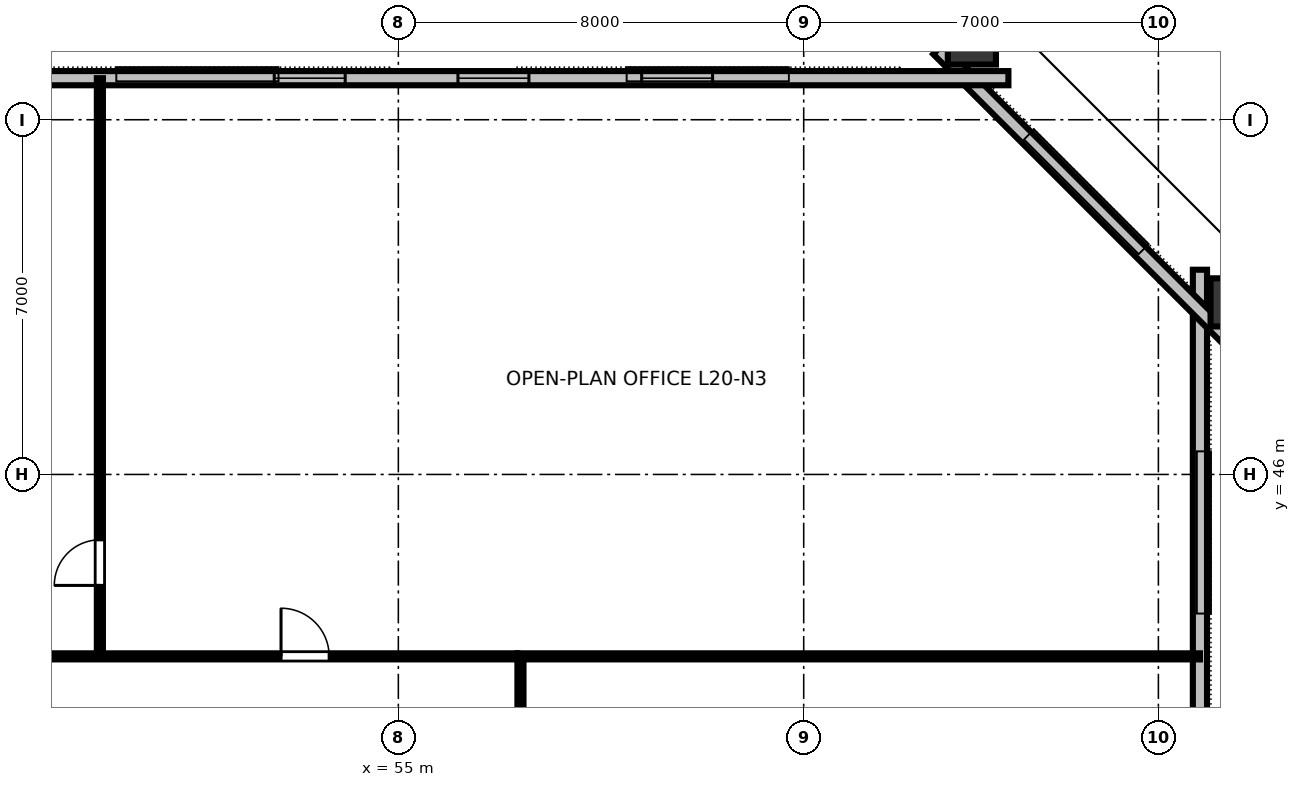
"""IFC4 building model, lengths in metres.
Left out: names, types, materials, properties, quantities, classifications, styles, units other than length and angle.
Written with IfcOpenShell. Run it as: python <this file> out.ifc"""

import sys

from ifc_helpers import new_model, si_unit, direction, frame, frame_2d, origin, origin_2d, place, context, subcontext, project, spatial, rectangle, hollow_rectangle, extrude, element, fill, save


model = new_model("IFC4")
c1 = context("Model", 3, precision=1e-05, world=origin(), true_north=direction((0.0, 1.0)))
c2 = subcontext(c1, "Body", "Model", "MODEL_VIEW")
j1 = project(units=[si_unit("LENGTHUNIT", "METRE"), si_unit("PLANEANGLEUNIT", "RADIAN")], contexts=[c1])
p1 = place(None, origin())
s1 = spatial("IfcSite", under=j1, at=p1, CompositionType="ELEMENT")
p2 = place(p1, origin())
s2 = spatial("IfcBuilding", under=s1, at=p2, CompositionType="ELEMENT")
p3 = place(p2, frame((0.0, 0.0, 78.4)))
s3 = spatial("IfcBuildingStorey", under=s2, at=p3, CompositionType="ELEMENT", Elevation=78.4)
p4 = place(p3, frame((71.604, 49.396, 0.0), z_axis=(-0.186998264307, -0.199376234682, 0.961915155401), x_axis=(0.658048855079, 0.701607062764, 0.273348191525)))
e1 = element("IfcColumn", 1, at=p4, inside=s3, PredefinedType="COLUMN", context=c2, shape_type="SweptSolid", body=[
    extrude(hollow_rectangle(XDim=0.95, YDim=1.15, WallThickness=0.06, at=origin_2d()), origin(), (0.0, 0.0, 1.0), 3.491),
])
p5 = place(p3, frame((66.319, 54.664, 0.0), z_axis=(-0.227706652534, -0.158346926777, 0.960768406627), x_axis=(0.570924282853, -0.821002718174, 0.0)))
e2 = element("IfcColumn", 2, at=p5, inside=s3, PredefinedType="COLUMN", context=c2, shape_type="SweptSolid", body=[
    extrude(hollow_rectangle(XDim=0.95, YDim=1.15, WallThickness=0.06, at=origin_2d()), origin(), (0.0, 0.0, 1.0), 3.495),
])
p6 = place(p3, frame((70.82, 13.96, 0.0), z_axis=(0.0, 0.0, 1.0), x_axis=(0.0, 1.0, 0.0)))
e3 = element("IfcWall", 3, at=p6, inside=s3, PredefinedType="STANDARD", context=c2, shape_type="SweptSolid", body=[
    extrude(rectangle(XDim=36.08, YDim=0.28, at=frame_2d((18.04, 0.0))), origin(), (0.0, 0.0, 1.0), 2.662),
])
p7 = place(p6, frame((9.811, 0.0, 0.85)))
e4 = element("IfcOpeningElement", 4, at=p7, cuts=e3, PredefinedType="OPENING", context=c2, shape_type="SweptSolid", body=[
    extrude(rectangle(XDim=1.4, YDim=1.2, at=frame_2d((0.7, 0.6))), frame((0.0, 0.15, 0.0), z_axis=(0.0, -1.0, 0.0), x_axis=(1.0, 0.0, 0.0)), (0.0, 0.0, 1.0), 0.3),
])
p8 = place(p6, frame((13.576, 0.0, 0.85)))
e5 = element("IfcOpeningElement", 5, at=p8, cuts=e3, PredefinedType="OPENING", context=c2, shape_type="SweptSolid", body=[
    extrude(rectangle(XDim=1.4, YDim=1.2, at=frame_2d((0.7, 0.6))), frame((0.0, 0.15, 0.0), z_axis=(0.0, -1.0, 0.0), x_axis=(1.0, 0.0, 0.0)), (0.0, 0.0, 1.0), 0.3),
])
p9 = place(p6, frame((21.104, 0.0, 0.85)))
e6 = element("IfcOpeningElement", 6, at=p9, cuts=e3, PredefinedType="OPENING", context=c2, shape_type="SweptSolid", body=[
    extrude(rectangle(XDim=1.4, YDim=1.2, at=frame_2d((0.7, 0.6))), frame((0.0, 0.15, 0.0), z_axis=(0.0, -1.0, 0.0), x_axis=(1.0, 0.0, 0.0)), (0.0, 0.0, 1.0), 0.3),
])
p10 = place(p6, frame((24.869, 0.0, 0.85)))
e7 = element("IfcOpeningElement", 7, at=p10, cuts=e3, PredefinedType="OPENING", context=c2, shape_type="SweptSolid", body=[
    extrude(rectangle(XDim=1.4, YDim=1.2, at=frame_2d((0.7, 0.6))), frame((0.0, 0.15, 0.0), z_axis=(0.0, -1.0, 0.0), x_axis=(1.0, 0.0, 0.0)), (0.0, 0.0, 1.0), 0.3),
])
p11 = place(p3, frame((71.394, 48.655, 0.0), z_axis=(0.0, 0.0, 1.0), x_axis=(-0.707106781187, 0.707106781187, 0.0)))
e8 = element("IfcWall", 8, at=p11, inside=s3, PredefinedType="STANDARD", context=c2, shape_type="SweptSolid", body=[
    extrude(rectangle(XDim=8.116, YDim=0.28, at=frame_2d((4.058, 0.0))), origin(), (0.0, 0.0, 1.0), 2.662),
])
p12 = place(p3, frame((67.04, 53.82, 0.0), z_axis=(0.0, 0.0, 1.0), x_axis=(-1.0, 0.0, 0.0)))
e9 = element("IfcWall", 9, at=p12, inside=s3, PredefinedType="STANDARD", context=c2, shape_type="SweptSolid", body=[
    extrude(rectangle(XDim=42.08, YDim=0.28, at=frame_2d((21.04, 0.0))), origin(), (0.0, 0.0, 1.0), 2.662),
])
p13 = place(p12, frame((5.838, 0.0, 0.85)))
e10 = element("IfcOpeningElement", 10, at=p13, cuts=e9, PredefinedType="OPENING", context=c2, shape_type="SweptSolid", body=[
    extrude(rectangle(XDim=1.4, YDim=1.2, at=frame_2d((0.7, 0.6))), frame((0.0, 0.15, 0.0), z_axis=(0.0, -1.0, 0.0), x_axis=(1.0, 0.0, 0.0)), (0.0, 0.0, 1.0), 0.3),
])
p14 = place(p12, frame((9.464, 0.0, 0.85)))
e11 = element("IfcOpeningElement", 11, at=p14, cuts=e9, PredefinedType="OPENING", context=c2, shape_type="SweptSolid", body=[
    extrude(rectangle(XDim=1.4, YDim=1.2, at=frame_2d((0.7, 0.6))), frame((0.0, 0.15, 0.0), z_axis=(0.0, -1.0, 0.0), x_axis=(1.0, 0.0, 0.0)), (0.0, 0.0, 1.0), 0.3),
])
p15 = place(p12, frame((13.089, 0.0, 0.85)))
e12 = element("IfcOpeningElement", 12, at=p15, cuts=e9, PredefinedType="OPENING", context=c2, shape_type="SweptSolid", body=[
    extrude(rectangle(XDim=1.4, YDim=1.2, at=frame_2d((0.7, 0.6))), frame((0.0, 0.15, 0.0), z_axis=(0.0, -1.0, 0.0), x_axis=(1.0, 0.0, 0.0)), (0.0, 0.0, 1.0), 0.3),
])
p16 = place(p12, frame((23.966, 0.0, 0.85)))
e13 = element("IfcOpeningElement", 13, at=p16, cuts=e9, PredefinedType="OPENING", context=c2, shape_type="SweptSolid", body=[
    extrude(rectangle(XDim=1.4, YDim=1.2, at=frame_2d((0.7, 0.6))), frame((0.0, 0.15, 0.0), z_axis=(0.0, -1.0, 0.0), x_axis=(1.0, 0.0, 0.0)), (0.0, 0.0, 1.0), 0.3),
])
p17 = place(p12, frame((27.591, 0.0, 0.85)))
e14 = element("IfcOpeningElement", 14, at=p17, cuts=e9, PredefinedType="OPENING", context=c2, shape_type="SweptSolid", body=[
    extrude(rectangle(XDim=1.4, YDim=1.2, at=frame_2d((0.7, 0.6))), frame((0.0, 0.15, 0.0), z_axis=(0.0, -1.0, 0.0), x_axis=(1.0, 0.0, 0.0)), (0.0, 0.0, 1.0), 0.3),
])
p18 = place(p12, frame((31.216, 0.0, 0.85)))
e15 = element("IfcOpeningElement", 15, at=p18, cuts=e9, PredefinedType="OPENING", context=c2, shape_type="SweptSolid", body=[
    extrude(rectangle(XDim=1.4, YDim=1.2, at=frame_2d((0.7, 0.6))), frame((0.0, 0.15, 0.0), z_axis=(0.0, -1.0, 0.0), x_axis=(1.0, 0.0, 0.0)), (0.0, 0.0, 1.0), 0.3),
])
p19 = place(p12, frame((34.842, 0.0, 0.85)))
e16 = element("IfcOpeningElement", 16, at=p19, cuts=e9, PredefinedType="OPENING", context=c2, shape_type="SweptSolid", body=[
    extrude(rectangle(XDim=1.4, YDim=1.2, at=frame_2d((0.7, 0.6))), frame((0.0, 0.15, 0.0), z_axis=(0.0, -1.0, 0.0), x_axis=(1.0, 0.0, 0.0)), (0.0, 0.0, 1.0), 0.3),
])
p20 = place(p3, frame((49.11, 42.41, 0.0), z_axis=(0.0, 0.0, 1.0), x_axis=(0.0, 1.0, 0.0)))
e17 = element("IfcWall", 17, at=p20, inside=s3, PredefinedType="PARTITIONING", context=c2, shape_type="SweptSolid", body=[
    extrude(rectangle(XDim=11.41, YDim=0.12, at=frame_2d((5.705, 0.0))), origin(), (0.0, 0.0, 1.0), 2.64),
])
p21 = place(p20, frame((1.4, 0.0, 0.0)))
e18 = element("IfcOpeningElement", 18, at=p21, cuts=e17, PredefinedType="OPENING", context=c2, shape_type="SweptSolid", body=[
    extrude(rectangle(XDim=0.9, YDim=2.15, at=frame_2d((0.45, 1.075))), frame((0.0, 0.07, 0.0), z_axis=(0.0, -1.0, 0.0), x_axis=(1.0, 0.0, 0.0)), (0.0, 0.0, 1.0), 0.14),
])
p22 = place(p3, frame((34.65, 42.41, 0.0), z_axis=(0.0, 0.0, 1.0), x_axis=(1.0, 0.0, 0.0)))
e19 = element("IfcWall", 19, at=p22, inside=s3, PredefinedType="PARTITIONING", context=c2, shape_type="SweptSolid", body=[
    extrude(rectangle(XDim=22.7, YDim=0.12, at=frame_2d((11.35, 0.0))), origin(), (0.0, 0.0, 1.0), 2.64),
])
p23 = place(p22, frame((4.272, 0.0, 0.0)))
e20 = element("IfcOpeningElement", 20, at=p23, cuts=e19, PredefinedType="OPENING", context=c2, shape_type="SweptSolid", body=[
    extrude(rectangle(XDim=0.95, YDim=2.15, at=frame_2d((0.475, 1.075))), frame((0.0, 0.07, 0.0), z_axis=(0.0, -1.0, 0.0), x_axis=(1.0, 0.0, 0.0)), (0.0, 0.0, 1.0), 0.14),
])
p24 = place(p22, frame((11.432, 0.0, 0.0)))
e21 = element("IfcOpeningElement", 21, at=p24, cuts=e19, PredefinedType="OPENING", context=c2, shape_type="SweptSolid", body=[
    extrude(rectangle(XDim=0.95, YDim=2.15, at=frame_2d((0.475, 1.075))), frame((0.0, 0.07, 0.0), z_axis=(0.0, -1.0, 0.0), x_axis=(1.0, 0.0, 0.0)), (0.0, 0.0, 1.0), 0.14),
])
p25 = place(p22, frame((18.035, 0.0, 0.0)))
e22 = element("IfcOpeningElement", 22, at=p25, cuts=e19, PredefinedType="OPENING", context=c2, shape_type="SweptSolid", body=[
    extrude(rectangle(XDim=0.95, YDim=2.15, at=frame_2d((0.475, 1.075))), frame((0.0, 0.07, 0.0), z_axis=(0.0, -1.0, 0.0), x_axis=(1.0, 0.0, 0.0)), (0.0, 0.0, 1.0), 0.14),
])
p26 = place(p3, frame((57.41, 21.65, 0.0), z_axis=(0.0, 0.0, 1.0), x_axis=(0.0, 1.0, 0.0)))
e23 = element("IfcWall", 23, at=p26, inside=s3, PredefinedType="PARTITIONING", context=c2, shape_type="SweptSolid", body=[
    extrude(rectangle(XDim=20.7, YDim=0.12, at=frame_2d((10.35, 0.0))), origin(), (0.0, 0.0, 1.0), 2.64),
])
p27 = place(p26, frame((4.931, 0.0, 0.0)))
e24 = element("IfcOpeningElement", 24, at=p27, cuts=e23, PredefinedType="OPENING", context=c2, shape_type="SweptSolid", body=[
    extrude(rectangle(XDim=0.95, YDim=2.15, at=frame_2d((0.475, 1.075))), frame((0.0, 0.07, 0.0), z_axis=(0.0, -1.0, 0.0), x_axis=(1.0, 0.0, 0.0)), (0.0, 0.0, 1.0), 0.14),
])
p28 = place(p26, frame((15.081, 0.0, 0.0)))
e25 = element("IfcOpeningElement", 25, at=p28, cuts=e23, PredefinedType="OPENING", context=c2, shape_type="SweptSolid", body=[
    extrude(rectangle(XDim=0.95, YDim=2.15, at=frame_2d((0.475, 1.075))), frame((0.0, 0.07, 0.0), z_axis=(0.0, -1.0, 0.0), x_axis=(1.0, 0.0, 0.0)), (0.0, 0.0, 1.0), 0.14),
])
p29 = place(p3, frame((57.35, 42.41, 0.0), z_axis=(0.0, 0.0, 1.0), x_axis=(1.0, 0.0, 0.0)))
e26 = element("IfcWall", 26, at=p29, inside=s3, PredefinedType="PARTITIONING", context=c2, shape_type="SweptSolid", body=[
    extrude(rectangle(XDim=13.47, YDim=0.12, at=frame_2d((6.735, 0.0))), origin(), (0.0, 0.0, 1.0), 2.64),
])
p30 = place(p13, origin())
e27 = element("IfcWindow", 27, at=p30, inside=s3, PartitioningType="SINGLE_PANEL", PredefinedType="WINDOW", context=c2, shape_type="SweptSolid", body=[
    extrude(rectangle(XDim=1.4, YDim=1.2, at=frame_2d((0.7, 0.6))), frame((0.0, 0.03, 0.0), z_axis=(0.0, -1.0, 0.0), x_axis=(1.0, 0.0, 0.0)), (0.0, 0.0, 1.0), 0.06),
])
fill(e10, e27)
p31 = place(p14, origin())
e28 = element("IfcWindow", 28, at=p31, inside=s3, PartitioningType="SINGLE_PANEL", PredefinedType="WINDOW", context=c2, shape_type="SweptSolid", body=[
    extrude(rectangle(XDim=1.4, YDim=1.2, at=frame_2d((0.7, 0.6))), frame((0.0, 0.03, 0.0), z_axis=(0.0, -1.0, 0.0), x_axis=(1.0, 0.0, 0.0)), (0.0, 0.0, 1.0), 0.06),
])
fill(e11, e28)
p32 = place(p15, origin())
e29 = element("IfcWindow", 29, at=p32, inside=s3, PartitioningType="SINGLE_PANEL", PredefinedType="WINDOW", context=c2, shape_type="SweptSolid", body=[
    extrude(rectangle(XDim=1.4, YDim=1.2, at=frame_2d((0.7, 0.6))), frame((0.0, 0.03, 0.0), z_axis=(0.0, -1.0, 0.0), x_axis=(1.0, 0.0, 0.0)), (0.0, 0.0, 1.0), 0.06),
])
fill(e12, e29)
p33 = place(p21, origin())
e30 = element("IfcDoor", 30, at=p33, inside=s3, OperationType="SINGLE_SWING_LEFT", PredefinedType="DOOR", context=c2, shape_type="SweptSolid", body=[
    extrude(rectangle(XDim=0.9, YDim=2.15, at=frame_2d((0.45, 1.075))), frame((0.0, 0.025, 0.0), z_axis=(0.0, -1.0, 0.0), x_axis=(1.0, 0.0, 0.0)), (0.0, 0.0, 1.0), 0.05),
])
fill(e18, e30)
p34 = place(p25, origin())
e31 = element("IfcDoor", 31, at=p34, inside=s3, OperationType="SINGLE_SWING_LEFT", PredefinedType="DOOR", context=c2, shape_type="SweptSolid", body=[
    extrude(rectangle(XDim=0.95, YDim=2.15, at=frame_2d((0.475, 1.075))), frame((0.0, 0.025, 0.0), z_axis=(0.0, -1.0, 0.0), x_axis=(1.0, 0.0, 0.0)), (0.0, 0.0, 1.0), 0.05),
])
fill(e22, e31)
save(model, sys.argv[1])
